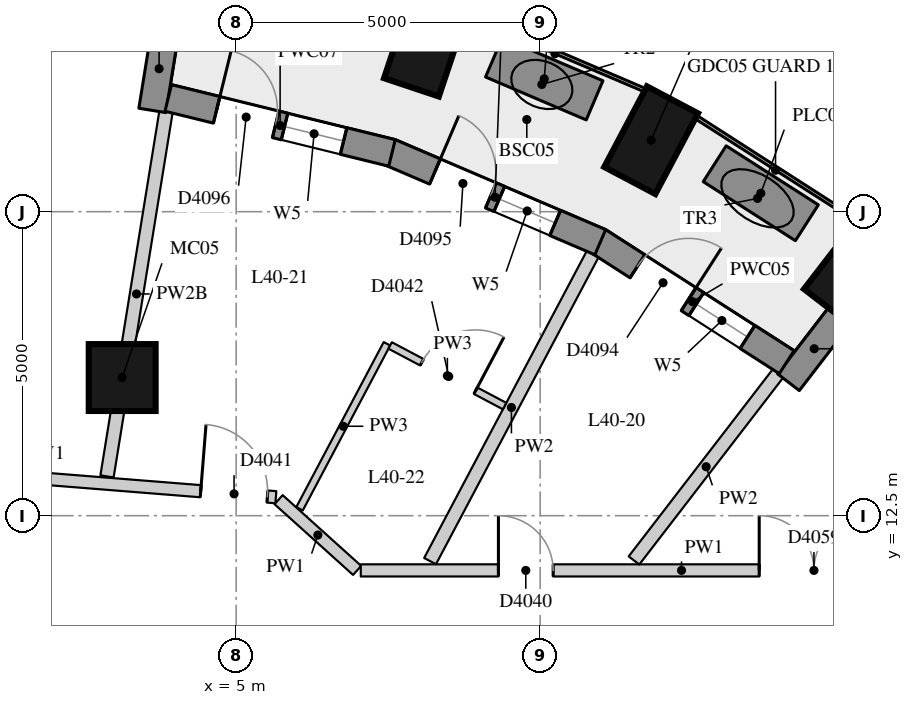
"""IFC4 building model, lengths in metres.
Left out: names, types, materials, properties, quantities, classifications, styles, units other than length and angle.
Written with IfcOpenShell. Run it as: python <this file> out.ifc"""

import sys

from ifc_helpers import new_model, si_unit, direction, frame, frame_2d, origin, origin_2d, place, context, subcontext, project, spatial, rectangle, extrude, element, fill, save


model = new_model("IFC4")
c1 = context("Model", 3, precision=1e-05, world=origin(), true_north=direction((0.0, 1.0)))
c2 = subcontext(c1, "Body", "Model", "MODEL_VIEW")
j1 = project(units=[si_unit("LENGTHUNIT", "METRE"), si_unit("PLANEANGLEUNIT", "RADIAN")], contexts=[c1])
p1 = place(None, origin())
s1 = spatial("IfcSite", under=j1, at=p1, CompositionType="ELEMENT")
p2 = place(p1, origin())
s2 = spatial("IfcBuilding", under=s1, at=p2, CompositionType="ELEMENT")
p3 = place(p2, frame((0.0, 0.0, 145.1)))
s3 = spatial("IfcBuildingStorey", under=s2, at=p3, CompositionType="ELEMENT", Elevation=145.1)
for number, where, z_axis, x_axis in (
    (1, (15.173, 16.532, 0.0), (0.0, 0.0, 1.0), (0.61, 0.792, 0.0)),
    (2, (11.825, 18.676, 0.0), (0.0, 0.0, 1.0), (0.468, 0.884, 0.0)),
    (3, (8.12, 20.256, 0.0), (0.0, 0.0, 1.0), (0.317, 0.949, 0.0)),
):
    element("IfcColumn", number, at=place(p3, frame(where, z_axis=z_axis, x_axis=x_axis)), inside=s3, PredefinedType="COLUMN", context=c2, shape_type="SweptSolid", body=[
        extrude(rectangle(XDim=1.5, YDim=0.95, at=origin_2d()), origin(), (0.0, 0.0, 1.0), 3.3),
    ])
p4 = place(p3, frame((3.126, 14.772, 0.0), z_axis=(0.0, 0.0, 1.0), x_axis=(1.0, 0.0, 0.0)))
e4 = element("IfcColumn", 4, at=p4, inside=s3, PredefinedType="COLUMN", context=c2, shape_type="SweptSolid", body=[
    extrude(rectangle(XDim=1.1, YDim=1.1, at=origin_2d()), origin(), (0.0, 0.0, 1.0), 3.3),
])
p5 = place(p3, frame((14.931, 15.797, 0.0), z_axis=(0.0, 0.0, 1.0), x_axis=(-0.609897399413, -0.792480385996, 0.0)))
e5 = element("IfcWall", 5, at=p5, inside=s3, PredefinedType="SOLIDWALL", context=c2, shape_type="SweptSolid", body=[
    extrude(rectangle(XDim=1.391, YDim=0.45, at=frame_2d((0.695, 0.0))), origin(), (0.0, 0.0, 1.0), 3.02),
])
p6 = place(p3, frame((3.844, 20.538, 0.0), z_axis=(0.0, 0.0, 1.0), x_axis=(-0.159641024018, -0.98717513312, 0.0)))
e6 = element("IfcWall", 6, at=p6, inside=s3, PredefinedType="SOLIDWALL", context=c2, shape_type="SweptSolid", body=[
    extrude(rectangle(XDim=1.39, YDim=0.45, at=frame_2d((0.695, 0.0))), origin(), (0.0, 0.0, 1.0), 2.57),
])
p7 = place(p3, frame((14.054, 15.025, 0.0), z_axis=(0.0, 0.0, 1.0), x_axis=(-0.841393801846, 0.54042249233, 0.0)))
e7 = element("IfcWall", 7, at=p7, inside=s3, PredefinedType="SOLIDWALL", context=c2, shape_type="SweptSolid", body=[
    extrude(rectangle(XDim=3.683, YDim=0.45, at=frame_2d((1.841, 0.0))), origin(), (0.0, 0.0, 1.0), 3.02),
])
p8 = place(p7, frame((0.766, 0.0, 0.4)))
e8 = element("IfcOpeningElement", 8, at=p8, cuts=e7, PredefinedType="OPENING", context=c2, shape_type="SweptSolid", body=[
    extrude(rectangle(XDim=1.0, YDim=1.75, at=frame_2d((0.5, 0.875))), frame((0.0, 0.235, 0.0), z_axis=(0.0, -1.0, 0.0), x_axis=(1.0, 0.0, 0.0)), (0.0, 0.0, 1.0), 0.47),
])
p9 = place(p7, frame((1.916, 0.0, 0.0)))
e9 = element("IfcOpeningElement", 9, at=p9, cuts=e7, PredefinedType="OPENING", context=c2, shape_type="SweptSolid", body=[
    extrude(rectangle(XDim=1.0, YDim=2.15, at=frame_2d((0.5, 1.075))), frame((0.0, 0.235, 0.0), z_axis=(0.0, -1.0, 0.0), x_axis=(1.0, 0.0, 0.0)), (0.0, 0.0, 1.0), 0.47),
])
p10 = place(p3, frame((10.988, 16.998, 0.0), z_axis=(0.0, 0.0, 1.0), x_axis=(-0.919443425894, 0.393222311907, 0.0)))
e10 = element("IfcWall", 10, at=p10, inside=s3, PredefinedType="SOLIDWALL", context=c2, shape_type="SweptSolid", body=[
    extrude(rectangle(XDim=3.763, YDim=0.45, at=frame_2d((1.882, 0.0))), origin(), (0.0, 0.0, 1.0), 3.02),
])
p11 = place(p10, frame((0.807, 0.0, 0.4)))
e11 = element("IfcOpeningElement", 11, at=p11, cuts=e10, PredefinedType="OPENING", context=c2, shape_type="SweptSolid", body=[
    extrude(rectangle(XDim=1.0, YDim=1.75, at=frame_2d((0.5, 0.875))), frame((0.0, 0.235, 0.0), z_axis=(0.0, -1.0, 0.0), x_axis=(1.0, 0.0, 0.0)), (0.0, 0.0, 1.0), 0.47),
])
p12 = place(p10, frame((1.957, 0.0, 0.0)))
e12 = element("IfcOpeningElement", 12, at=p12, cuts=e10, PredefinedType="OPENING", context=c2, shape_type="SweptSolid", body=[
    extrude(rectangle(XDim=1.0, YDim=2.15, at=frame_2d((0.5, 1.075))), frame((0.0, 0.235, 0.0), z_axis=(0.0, -1.0, 0.0), x_axis=(1.0, 0.0, 0.0)), (0.0, 0.0, 1.0), 0.47),
])
p13 = place(p3, frame((7.563, 18.466, 0.0), z_axis=(0.0, 0.0, 1.0), x_axis=(-0.97110866251, 0.238637728782, 0.0)))
e13 = element("IfcWall", 13, at=p13, inside=s3, PredefinedType="SOLIDWALL", context=c2, shape_type="SweptSolid", body=[
    extrude(rectangle(XDim=3.789, YDim=0.45, at=frame_2d((1.895, 0.0))), origin(), (0.0, 0.0, 1.0), 3.02),
])
p14 = place(p13, frame((0.82, 0.0, 0.4)))
e14 = element("IfcOpeningElement", 14, at=p14, cuts=e13, PredefinedType="OPENING", context=c2, shape_type="SweptSolid", body=[
    extrude(rectangle(XDim=1.0, YDim=1.75, at=frame_2d((0.5, 0.875))), frame((0.0, 0.235, 0.0), z_axis=(0.0, -1.0, 0.0), x_axis=(1.0, 0.0, 0.0)), (0.0, 0.0, 1.0), 0.47),
])
p15 = place(p13, frame((1.97, 0.0, 0.0)))
e15 = element("IfcOpeningElement", 15, at=p15, cuts=e13, PredefinedType="OPENING", context=c2, shape_type="SweptSolid", body=[
    extrude(rectangle(XDim=1.0, YDim=2.15, at=frame_2d((0.5, 1.075))), frame((0.0, 0.235, 0.0), z_axis=(0.0, -1.0, 0.0), x_axis=(1.0, 0.0, 0.0)), (0.0, 0.0, 1.0), 0.47),
])
p16 = place(p3, frame((14.386, 17.318, 0.0), z_axis=(0.0, 0.0, 1.0), x_axis=(-0.842032375698, 0.539426990682, 0.0)))
e16 = element("IfcWall", 16, at=p16, inside=s3, PredefinedType="USERDEFINED", context=c2, shape_type="SweptSolid", body=[
    extrude(rectangle(XDim=1.8, YDim=0.7, at=frame_2d((0.9, 0.0))), origin(), (0.0, 0.0, 1.0), 0.75),
])
p17 = place(p3, frame((10.895, 19.331, 0.0), z_axis=(0.0, 0.0, 1.0), x_axis=(-0.91978926552, 0.392412674406, 0.0)))
e17 = element("IfcWall", 17, at=p17, inside=s3, PredefinedType="USERDEFINED", context=c2, shape_type="SweptSolid", body=[
    extrude(rectangle(XDim=1.8, YDim=0.7, at=frame_2d((0.9, 0.0))), origin(), (0.0, 0.0, 1.0), 0.75),
])
p18 = place(p3, frame((-2.669, 13.468, 0.0), z_axis=(0.0, 0.0, 1.0), x_axis=(0.996831622407, -0.079540659849, 0.0)))
e18 = element("IfcWall", 18, at=p18, inside=s3, PredefinedType="PARTITIONING", context=c2, shape_type="SweptSolid", body=[
    extrude(rectangle(XDim=8.349, YDim=0.2, at=frame_2d((4.174, 0.0))), origin(), (0.0, 0.0, 1.0), 3.02),
])
p19 = place(p18, frame((7.109, 0.0, 0.0)))
e19 = element("IfcOpeningElement", 19, at=p19, cuts=e18, PredefinedType="OPENING", context=c2, shape_type="SweptSolid", body=[
    extrude(rectangle(XDim=1.1, YDim=2.1, at=frame_2d((0.55, 1.05))), frame((0.0, 0.11, 0.0), z_axis=(0.0, -1.0, 0.0), x_axis=(1.0, 0.0, 0.0)), (0.0, 0.0, 1.0), 0.22),
])
p20 = place(p18, frame((1.775, 0.0, 0.0)))
e20 = element("IfcOpeningElement", 20, at=p20, cuts=e18, PredefinedType="OPENING", context=c2, shape_type="SweptSolid", body=[
    extrude(rectangle(XDim=1.8, YDim=2.1, at=frame_2d((0.9, 1.05))), frame((0.0, 0.11, 0.0), z_axis=(0.0, -1.0, 0.0), x_axis=(1.0, 0.0, 0.0)), (0.0, 0.0, 1.0), 0.22),
])
p21 = place(p3, frame((5.698, 12.764, 0.0), z_axis=(0.0, 0.0, 1.0), x_axis=(0.742944876657, -0.669352605321, 0.0)))
e21 = element("IfcWall", 21, at=p21, inside=s3, PredefinedType="PARTITIONING", context=c2, shape_type="SweptSolid", body=[
    extrude(rectangle(XDim=1.738, YDim=0.2, at=frame_2d((0.869, 0.0))), origin(), (0.0, 0.0, 1.0), 3.02),
])
p22 = place(p3, frame((7.05, 11.6, 0.0), z_axis=(0.0, 0.0, 1.0), x_axis=(1.0, 0.0, 0.0)))
e22 = element("IfcWall", 22, at=p22, inside=s3, PredefinedType="PARTITIONING", context=c2, shape_type="SweptSolid", body=[
    extrude(rectangle(XDim=10.551, YDim=0.2, at=frame_2d((5.275, 0.0))), origin(), (0.0, 0.0, 1.0), 3.02),
])
p23 = place(p22, frame((2.264, 0.0, 0.0)))
e23 = element("IfcOpeningElement", 23, at=p23, cuts=e22, PredefinedType="OPENING", context=c2, shape_type="SweptSolid", body=[
    extrude(rectangle(XDim=0.9, YDim=2.1, at=frame_2d((0.45, 1.05))), frame((0.0, 0.11, 0.0), z_axis=(0.0, -1.0, 0.0), x_axis=(1.0, 0.0, 0.0)), (0.0, 0.0, 1.0), 0.22),
])
p24 = place(p22, frame((6.553, 0.0, 0.0)))
e24 = element("IfcOpeningElement", 24, at=p24, cuts=e22, PredefinedType="OPENING", context=c2, shape_type="SweptSolid", body=[
    extrude(rectangle(XDim=1.8, YDim=2.1, at=frame_2d((0.9, 1.05))), frame((0.0, 0.11, 0.0), z_axis=(0.0, -1.0, 0.0), x_axis=(1.0, 0.0, 0.0)), (0.0, 0.0, 1.0), 0.22),
])
p25 = place(p3, frame((13.916, 14.846, 0.0), z_axis=(0.0, 0.0, 1.0), x_axis=(-0.610023079405, -0.792383646091, 0.0)))
e25 = element("IfcWall", 25, at=p25, inside=s3, PredefinedType="PARTITIONING", context=c2, shape_type="SweptSolid", body=[
    extrude(rectangle(XDim=3.89, YDim=0.22, at=frame_2d((1.945, 0.0))), origin(), (0.0, 0.0, 1.0), 3.02),
])
p26 = place(p3, frame((10.865, 16.806, 0.0), z_axis=(0.0, 0.0, 1.0), x_axis=(-0.468046615648, -0.883703777054, 0.0)))
e26 = element("IfcWall", 26, at=p26, inside=s3, PredefinedType="PARTITIONING", context=c2, shape_type="SweptSolid", body=[
    extrude(rectangle(XDim=5.718, YDim=0.22, at=frame_2d((2.859, 0.0))), origin(), (0.0, 0.0, 1.0), 3.02),
])
p27 = place(p3, frame((3.847, 19.148, 0.0), z_axis=(0.0, 0.0, 1.0), x_axis=(-0.159656618209, -0.987172611179, 0.0)))
e27 = element("IfcWall", 27, at=p27, inside=s3, PredefinedType="PARTITIONING", context=c2, shape_type="SweptSolid", body=[
    extrude(rectangle(XDim=6.08, YDim=0.22, at=frame_2d((3.04, 0.0))), origin(), (0.0, 0.0, 1.0), 2.57),
])
p28 = place(p3, frame((6.042, 12.614, 0.0), z_axis=(0.0, 0.0, 1.0), x_axis=(0.46804844257, 0.883702809438, 0.0)))
e28 = element("IfcWall", 28, at=p28, inside=s3, PredefinedType="PARTITIONING", context=c2, shape_type="SweptSolid", body=[
    extrude(rectangle(XDim=3.071, YDim=0.12, at=frame_2d((1.535, 0.0))), origin(), (0.0, 0.0, 1.0), 3.02),
])
p29 = place(p3, frame((7.532, 15.3, 0.0), z_axis=(0.0, 0.0, 1.0), x_axis=(0.883707061275, -0.468040414764, 0.0)))
e29 = element("IfcWall", 29, at=p29, inside=s3, PredefinedType="PARTITIONING", context=c2, shape_type="SweptSolid", body=[
    extrude(rectangle(XDim=2.13, YDim=0.12, at=frame_2d((1.065, 0.0))), origin(), (0.0, 0.0, 1.0), 3.02),
])
p30 = place(p29, frame((0.59, 0.0, 0.0)))
e30 = element("IfcOpeningElement", 30, at=p30, cuts=e29, PredefinedType="OPENING", context=c2, shape_type="SweptSolid", body=[
    extrude(rectangle(XDim=1.0, YDim=2.1, at=frame_2d((0.5, 1.05))), frame((0.0, 0.07, 0.0), z_axis=(0.0, -1.0, 0.0), x_axis=(1.0, 0.0, 0.0)), (0.0, 0.0, 1.0), 0.14),
])
p31 = place(p8, origin())
e31 = element("IfcWindow", 31, at=p31, inside=s3, PartitioningType="SINGLE_PANEL", PredefinedType="WINDOW", context=c2, shape_type="SweptSolid", body=[
    extrude(rectangle(XDim=1.0, YDim=1.75, at=frame_2d((0.5, 0.875))), frame((0.0, 0.035, 0.0), z_axis=(0.0, -1.0, 0.0), x_axis=(1.0, 0.0, 0.0)), (0.0, 0.0, 1.0), 0.06),
])
fill(e8, e31)
p32 = place(p9, frame((1.0, 0.0, 0.0), z_axis=(0.0, 0.0, 1.0), x_axis=(-1.0, 0.0, 0.0)))
e32 = element("IfcDoor", 32, at=p32, inside=s3, OperationType="SINGLE_SWING_RIGHT", PredefinedType="DOOR", context=c2, shape_type="SweptSolid", body=[
    extrude(rectangle(XDim=1.0, YDim=2.15, at=frame_2d((0.5, 1.075))), frame((0.0, 0.075, 0.0), z_axis=(0.0, -1.0, 0.0), x_axis=(1.0, 0.0, 0.0)), (0.0, 0.0, 1.0), 0.05),
])
fill(e9, e32)
p33 = place(p11, origin())
e33 = element("IfcWindow", 33, at=p33, inside=s3, PartitioningType="SINGLE_PANEL", PredefinedType="WINDOW", context=c2, shape_type="SweptSolid", body=[
    extrude(rectangle(XDim=1.0, YDim=1.75, at=frame_2d((0.5, 0.875))), frame((0.0, 0.035, 0.0), z_axis=(0.0, -1.0, 0.0), x_axis=(1.0, 0.0, 0.0)), (0.0, 0.0, 1.0), 0.06),
])
fill(e11, e33)
p34 = place(p12, frame((1.0, 0.0, 0.0), z_axis=(0.0, 0.0, 1.0), x_axis=(-1.0, 0.0, 0.0)))
e34 = element("IfcDoor", 34, at=p34, inside=s3, OperationType="SINGLE_SWING_LEFT", PredefinedType="DOOR", context=c2, shape_type="SweptSolid", body=[
    extrude(rectangle(XDim=1.0, YDim=2.15, at=frame_2d((0.5, 1.075))), frame((0.0, 0.075, 0.0), z_axis=(0.0, -1.0, 0.0), x_axis=(1.0, 0.0, 0.0)), (0.0, 0.0, 1.0), 0.05),
])
fill(e12, e34)
p35 = place(p14, origin())
e35 = element("IfcWindow", 35, at=p35, inside=s3, PartitioningType="SINGLE_PANEL", PredefinedType="WINDOW", context=c2, shape_type="SweptSolid", body=[
    extrude(rectangle(XDim=1.0, YDim=1.75, at=frame_2d((0.5, 0.875))), frame((0.0, 0.035, 0.0), z_axis=(0.0, -1.0, 0.0), x_axis=(1.0, 0.0, 0.0)), (0.0, 0.0, 1.0), 0.06),
])
fill(e14, e35)
p36 = place(p15, frame((1.0, 0.0, 0.0), z_axis=(0.0, 0.0, 1.0), x_axis=(-1.0, 0.0, 0.0)))
e36 = element("IfcDoor", 36, at=p36, inside=s3, OperationType="SINGLE_SWING_LEFT", PredefinedType="DOOR", context=c2, shape_type="SweptSolid", body=[
    extrude(rectangle(XDim=1.0, YDim=2.15, at=frame_2d((0.5, 1.075))), frame((0.0, 0.075, 0.0), z_axis=(0.0, -1.0, 0.0), x_axis=(1.0, 0.0, 0.0)), (0.0, 0.0, 1.0), 0.05),
])
fill(e15, e36)
p37 = place(p23, origin())
e37 = element("IfcDoor", 37, at=p37, inside=s3, OperationType="SINGLE_SWING_LEFT", PredefinedType="DOOR", context=c2, shape_type="SweptSolid", body=[
    extrude(rectangle(XDim=0.9, YDim=2.1, at=frame_2d((0.45, 1.05))), frame((0.0, 0.025, 0.0), z_axis=(0.0, -1.0, 0.0), x_axis=(1.0, 0.0, 0.0)), (0.0, 0.0, 1.0), 0.05),
])
fill(e23, e37)
p38 = place(p19, origin())
e38 = element("IfcDoor", 38, at=p38, inside=s3, OperationType="SINGLE_SWING_LEFT", PredefinedType="DOOR", context=c2, shape_type="SweptSolid", body=[
    extrude(rectangle(XDim=1.1, YDim=2.1, at=frame_2d((0.55, 1.05))), frame((0.0, 0.025, 0.0), z_axis=(0.0, -1.0, 0.0), x_axis=(1.0, 0.0, 0.0)), (0.0, 0.0, 1.0), 0.05),
])
fill(e19, e38)
p39 = place(p30, origin())
e39 = element("IfcDoor", 39, at=p39, inside=s3, OperationType="SINGLE_SWING_RIGHT", PredefinedType="DOOR", context=c2, shape_type="SweptSolid", body=[
    extrude(rectangle(XDim=1.0, YDim=2.1, at=frame_2d((0.5, 1.05))), frame((0.0, 0.025, 0.0), z_axis=(0.0, -1.0, 0.0), x_axis=(1.0, 0.0, 0.0)), (0.0, 0.0, 1.0), 0.05),
])
fill(e30, e39)
p40 = place(p24, origin())
e40 = element("IfcDoor", 40, at=p40, inside=s3, OperationType="DOUBLE_DOOR_SINGLE_SWING", PredefinedType="DOOR", context=c2, shape_type="SweptSolid", body=[
    extrude(rectangle(XDim=1.8, YDim=2.1, at=frame_2d((0.9, 1.05))), frame((0.0, 0.025, 0.0), z_axis=(0.0, -1.0, 0.0), x_axis=(1.0, 0.0, 0.0)), (0.0, 0.0, 1.0), 0.05),
])
fill(e24, e40)
save(model, sys.argv[1])
